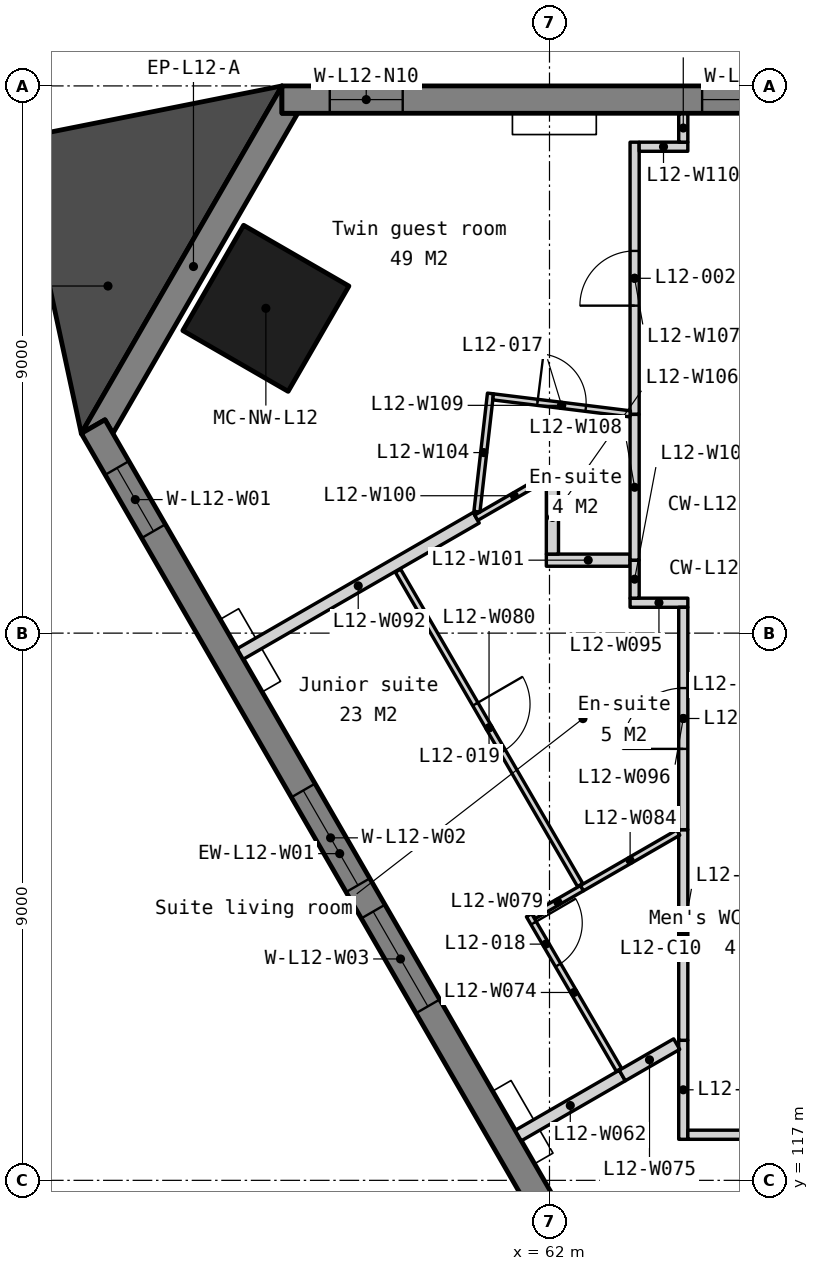
"""IFC4 building model, lengths in metres.
Left out: names, types, materials, properties, quantities, classifications, styles, units other than length and angle.
Written with IfcOpenShell. Run it as: python <this file> out.ifc"""

import sys

from ifc_helpers import new_model, si_unit, direction, frame, frame_2d, origin, origin_2d, place, context, subcontext, project, spatial, polyline, rectangle, outline, extrude, element, fill, save


model = new_model("IFC4")
c1 = context("Model", 3, precision=1e-05, world=origin(), true_north=direction((0.0, 1.0)))
c2 = subcontext(c1, "Body", "Model", "MODEL_VIEW")
j1 = project(units=[si_unit("LENGTHUNIT", "METRE"), si_unit("PLANEANGLEUNIT", "RADIAN")], contexts=[c1])
p1 = place(None, origin())
s1 = spatial("IfcSite", under=j1, at=p1, CompositionType="ELEMENT")
p2 = place(p1, origin())
s2 = spatial("IfcBuilding", under=s1, at=p2, CompositionType="ELEMENT")
p3 = place(p2, frame((0.0, 0.0, 56.0)))
s3 = spatial("IfcBuildingStorey", under=s2, at=p3, CompositionType="ELEMENT", Elevation=56.0)
p4 = place(p3, frame((57.336, 131.342, 0.0), z_axis=(0.0, 0.0, 1.0), x_axis=(-0.5, -0.866025403784, 0.0)))
e1 = element("IfcColumn", 1, at=p4, inside=s3, PredefinedType="COLUMN", context=c2, shape_type="SweptSolid", body=[
    extrude(rectangle(XDim=2.0, YDim=2.0, at=origin_2d()), origin(), (0.0, 0.0, 1.0), 3.5),
])
p5 = place(p3, frame((0.0, 0.0, -0.15)))
e2 = element("IfcWall", 2, at=p5, inside=s3, PredefinedType="SOLIDWALL", context=c2, shape_type="SweptSolid", body=[
    extrude(outline(polyline([(57.6, 135.0), (57.6, 134.55), (57.86, 134.55), (54.82, 129.284), (54.69, 129.509), (54.3, 129.284), (57.6, 135.0)])), origin(), (0.0, 0.0, 1.0), 3.5),
])
p6 = place(p3, frame((102.4, 134.775, -0.15), z_axis=(0.0, 0.0, 1.0), x_axis=(-1.0, 0.0, 0.0)))
e3 = element("IfcWall", 3, at=p6, inside=s3, PredefinedType="SOLIDWALL", context=c2, shape_type="SweptSolid", body=[
    extrude(outline(polyline([(44.8, 0.0), (44.8, 3.5), (0.0, 3.5), (0.0, 0.0), (44.8, 0.0)])), frame((0.0, 0.225, 0.0), z_axis=(0.0, -1.0, 0.0), x_axis=(1.0, 0.0, 0.0)), (0.0, 0.0, 1.0), 0.45),
])
p7 = place(p6, frame((0.786, 0.0, 1.05)))
e4 = element("IfcOpeningElement", 4, at=p7, cuts=e3, PredefinedType="OPENING", context=c2, shape_type="SweptSolid", body=[
    extrude(rectangle(XDim=1.2, YDim=1.5, at=frame_2d((0.6, 0.75))), frame((0.0, 0.235, 0.0), z_axis=(0.0, -1.0, 0.0), x_axis=(1.0, 0.0, 0.0)), (0.0, 0.0, 1.0), 0.47),
])
p8 = place(p6, frame((6.91, 0.0, 1.05)))
e5 = element("IfcOpeningElement", 5, at=p8, cuts=e3, PredefinedType="OPENING", context=c2, shape_type="SweptSolid", body=[
    extrude(rectangle(XDim=1.8, YDim=1.5, at=frame_2d((0.9, 0.75))), frame((0.0, 0.235, 0.0), z_axis=(0.0, -1.0, 0.0), x_axis=(1.0, 0.0, 0.0)), (0.0, 0.0, 1.0), 0.47),
])
p9 = place(p6, frame((9.21, 0.0, 1.05)))
e6 = element("IfcOpeningElement", 6, at=p9, cuts=e3, PredefinedType="OPENING", context=c2, shape_type="SweptSolid", body=[
    extrude(rectangle(XDim=1.8, YDim=1.5, at=frame_2d((0.9, 0.75))), frame((0.0, 0.235, 0.0), z_axis=(0.0, -1.0, 0.0), x_axis=(1.0, 0.0, 0.0)), (0.0, 0.0, 1.0), 0.47),
])
p10 = place(p6, frame((15.87, 0.0, 1.05)))
e7 = element("IfcOpeningElement", 7, at=p10, cuts=e3, PredefinedType="OPENING", context=c2, shape_type="SweptSolid", body=[
    extrude(rectangle(XDim=1.8, YDim=1.5, at=frame_2d((0.9, 0.75))), frame((0.0, 0.235, 0.0), z_axis=(0.0, -1.0, 0.0), x_axis=(1.0, 0.0, 0.0)), (0.0, 0.0, 1.0), 0.47),
])
p11 = place(p6, frame((18.17, 0.0, 1.05)))
e8 = element("IfcOpeningElement", 8, at=p11, cuts=e3, PredefinedType="OPENING", context=c2, shape_type="SweptSolid", body=[
    extrude(rectangle(XDim=1.8, YDim=1.5, at=frame_2d((0.9, 0.75))), frame((0.0, 0.235, 0.0), z_axis=(0.0, -1.0, 0.0), x_axis=(1.0, 0.0, 0.0)), (0.0, 0.0, 1.0), 0.47),
])
p12 = place(p6, frame((24.83, 0.0, 1.05)))
e9 = element("IfcOpeningElement", 9, at=p12, cuts=e3, PredefinedType="OPENING", context=c2, shape_type="SweptSolid", body=[
    extrude(rectangle(XDim=1.8, YDim=1.5, at=frame_2d((0.9, 0.75))), frame((0.0, 0.235, 0.0), z_axis=(0.0, -1.0, 0.0), x_axis=(1.0, 0.0, 0.0)), (0.0, 0.0, 1.0), 0.47),
])
p13 = place(p6, frame((27.13, 0.0, 1.05)))
e10 = element("IfcOpeningElement", 10, at=p13, cuts=e3, PredefinedType="OPENING", context=c2, shape_type="SweptSolid", body=[
    extrude(rectangle(XDim=1.8, YDim=1.5, at=frame_2d((0.9, 0.75))), frame((0.0, 0.235, 0.0), z_axis=(0.0, -1.0, 0.0), x_axis=(1.0, 0.0, 0.0)), (0.0, 0.0, 1.0), 0.47),
])
p14 = place(p6, frame((33.79, 0.0, 1.05)))
e11 = element("IfcOpeningElement", 11, at=p14, cuts=e3, PredefinedType="OPENING", context=c2, shape_type="SweptSolid", body=[
    extrude(rectangle(XDim=1.8, YDim=1.5, at=frame_2d((0.9, 0.75))), frame((0.0, 0.235, 0.0), z_axis=(0.0, -1.0, 0.0), x_axis=(1.0, 0.0, 0.0)), (0.0, 0.0, 1.0), 0.47),
])
p15 = place(p6, frame((36.09, 0.0, 1.05)))
e12 = element("IfcOpeningElement", 12, at=p15, cuts=e3, PredefinedType="OPENING", context=c2, shape_type="SweptSolid", body=[
    extrude(rectangle(XDim=1.8, YDim=1.5, at=frame_2d((0.9, 0.75))), frame((0.0, 0.235, 0.0), z_axis=(0.0, -1.0, 0.0), x_axis=(1.0, 0.0, 0.0)), (0.0, 0.0, 1.0), 0.47),
])
p16 = place(p6, frame((42.814, 0.0, 1.05)))
e13 = element("IfcOpeningElement", 13, at=p16, cuts=e3, PredefinedType="OPENING", context=c2, shape_type="SweptSolid", body=[
    extrude(rectangle(XDim=1.2, YDim=1.5, at=frame_2d((0.6, 0.75))), frame((0.0, 0.235, 0.0), z_axis=(0.0, -1.0, 0.0), x_axis=(1.0, 0.0, 0.0)), (0.0, 0.0, 1.0), 0.47),
])
p17 = place(p3, frame((54.495, 129.397, -0.15), z_axis=(0.0, 0.0, 1.0), x_axis=(0.499995201193, -0.866028174359, 0.0)))
e14 = element("IfcWall", 14, at=p17, inside=s3, PredefinedType="SOLIDWALL", context=c2, shape_type="SweptSolid", body=[
    extrude(outline(polyline([(0.0, 0.0), (0.0, 3.5), (16.22, 3.5), (16.22, 0.0), (0.0, 0.0)])), frame((0.0, 0.225, 0.0), z_axis=(0.0, -1.0, 0.0), x_axis=(1.0, 0.0, 0.0)), (0.0, 0.0, 1.0), 0.45),
])
p18 = place(p17, frame((0.786, 0.0, 1.05)))
e15 = element("IfcOpeningElement", 15, at=p18, cuts=e14, PredefinedType="OPENING", context=c2, shape_type="SweptSolid", body=[
    extrude(rectangle(XDim=1.2, YDim=1.5, at=frame_2d((0.6, 0.75))), frame((0.0, 0.235, 0.0), z_axis=(0.0, -1.0, 0.0), x_axis=(1.0, 0.0, 0.0)), (0.0, 0.0, 1.0), 0.47),
])
p19 = place(p17, frame((6.91, 0.0, 1.05)))
e16 = element("IfcOpeningElement", 16, at=p19, cuts=e14, PredefinedType="OPENING", context=c2, shape_type="SweptSolid", body=[
    extrude(rectangle(XDim=1.8, YDim=1.5, at=frame_2d((0.9, 0.75))), frame((0.0, 0.235, 0.0), z_axis=(0.0, -1.0, 0.0), x_axis=(1.0, 0.0, 0.0)), (0.0, 0.0, 1.0), 0.47),
])
p20 = place(p17, frame((9.21, 0.0, 1.05)))
e17 = element("IfcOpeningElement", 17, at=p20, cuts=e14, PredefinedType="OPENING", context=c2, shape_type="SweptSolid", body=[
    extrude(rectangle(XDim=1.8, YDim=1.5, at=frame_2d((0.9, 0.75))), frame((0.0, 0.235, 0.0), z_axis=(0.0, -1.0, 0.0), x_axis=(1.0, 0.0, 0.0)), (0.0, 0.0, 1.0), 0.47),
])
p21 = place(p2, frame((0.0, 0.0, 52.5)))
s4 = spatial("IfcBuildingStorey", under=s2, at=p21, CompositionType="ELEMENT", Elevation=52.5)
p22 = place(p21, frame((62.522, 115.042, 0.0), z_axis=(0.0, 0.0, 1.0), x_axis=(0.866047669374, 0.499961432884, 0.0)))
e18 = element("IfcWall", 18, at=p22, inside=s4, PredefinedType="SOLIDWALL", context=c2, shape_type="SweptSolid", body=[
    extrude(rectangle(XDim=3.95, YDim=0.45, at=frame_2d((1.975, 0.0))), origin(), (0.0, 0.0, 1.0), 6.85),
])
p23 = place(p3, frame((0.0, 0.0, -0.15)))
e19 = element("IfcWall", 19, at=p23, inside=s3, PredefinedType="SOLIDWALL", context=c2, shape_type="SweptSolid", body=[
    extrude(outline(polyline([(57.6, 135.0), (53.256, 134.134), (54.3, 129.284), (57.6, 135.0)])), origin(), (0.0, 0.0, 1.0), 3.5),
])
p24 = place(p3, frame((61.487, 117.737, 0.0), z_axis=(0.0, 0.0, 1.0), x_axis=(0.866051805705, 0.499954267743, 0.0)))
e20 = element("IfcWall", 20, at=p24, inside=s3, PredefinedType="PARTITIONING", context=c2, shape_type="SweptSolid", body=[
    extrude(rectangle(XDim=1.975, YDim=0.2, at=frame_2d((0.988, 0.0))), origin(), (0.0, 0.0, 1.0), 3.35),
])
p25 = place(p3, frame((64.2, 117.675, 0.0), z_axis=(0.0, 0.0, 1.0), x_axis=(0.0, 1.0, 0.0)))
e21 = element("IfcWall", 21, at=p25, inside=s3, PredefinedType="PARTITIONING", context=c2, shape_type="SweptSolid", body=[
    extrude(rectangle(XDim=1.628, YDim=0.15, at=frame_2d((0.814, 0.0))), origin(), (0.0, 0.0, 1.0), 3.35),
])
p26 = place(p3, frame((64.275, 117.75, 0.0), z_axis=(0.0, 0.0, 1.0), x_axis=(1.0, 0.0, 0.0)))
e22 = element("IfcWall", 22, at=p26, inside=s3, PredefinedType="PARTITIONING", context=c2, shape_type="SweptSolid", body=[
    extrude(rectangle(XDim=5.691, YDim=0.15, at=frame_2d((2.846, 0.0))), origin(), (0.0, 0.0, 1.0), 3.35),
])
p27 = place(p26, frame((2.396, 0.0, 0.0)))
e23 = element("IfcOpeningElement", 23, at=p27, cuts=e22, PredefinedType="OPENING", context=c2, shape_type="SweptSolid", body=[
    extrude(rectangle(XDim=0.9, YDim=2.1, at=frame_2d((0.45, 1.05))), frame((0.0, 0.085, 0.0), z_axis=(0.0, -1.0, 0.0), x_axis=(1.0, 0.0, 0.0)), (0.0, 0.0, 1.0), 0.17),
])
p28 = place(p3, frame((61.663, 121.361, 0.0), z_axis=(0.0, 0.0, 1.0), x_axis=(0.502884554521, -0.864353587847, 0.0)))
e24 = element("IfcWall", 24, at=p28, inside=s3, PredefinedType="PARTITIONING", context=c2, shape_type="SweptSolid", body=[
    extrude(rectangle(XDim=2.94, YDim=0.1, at=frame_2d((1.47, 0.0))), origin(), (0.0, 0.0, 1.0), 3.35),
])
p29 = place(p28, frame((0.15, 0.0, 0.0)))
e25 = element("IfcOpeningElement", 25, at=p29, cuts=e24, PredefinedType="OPENING", context=c2, shape_type="SweptSolid", body=[
    extrude(rectangle(XDim=0.8, YDim=2.1, at=frame_2d((0.4, 1.05))), frame((0.0, 0.06, 0.0), z_axis=(0.0, -1.0, 0.0), x_axis=(1.0, 0.0, 0.0)), (0.0, 0.0, 1.0), 0.12),
])
p30 = place(p3, frame((63.197, 118.724, 0.0), z_axis=(0.0, 0.0, 1.0), x_axis=(0.86596515875, 0.500104332946, 0.0)))
e26 = element("IfcWall", 26, at=p30, inside=s3, PredefinedType="PARTITIONING", context=c2, shape_type="SweptSolid", body=[
    extrude(rectangle(XDim=1.033, YDim=0.2, at=frame_2d((0.517, 0.0))), origin(), (0.0, 0.0, 1.0), 3.35),
])
p31 = place(p3, frame((61.74, 121.347, 0.0), z_axis=(0.0, 0.0, 1.0), x_axis=(0.866136792161, 0.499807020023, 0.0)))
e27 = element("IfcWall", 27, at=p31, inside=s3, PredefinedType="PARTITIONING", context=c2, shape_type="SweptSolid", body=[
    extrude(rectangle(XDim=0.916, YDim=0.1, at=frame_2d((0.458, 0.0))), origin(), (0.0, 0.0, 1.0), 3.35),
])
p32 = place(p3, frame((59.508, 127.028, 0.0), z_axis=(0.0, 0.0, 1.0), x_axis=(0.501422739792, -0.865202424881, 0.0)))
e28 = element("IfcWall", 28, at=p32, inside=s3, PredefinedType="PARTITIONING", context=c2, shape_type="SweptSolid", body=[
    extrude(rectangle(XDim=5.976, YDim=0.1, at=frame_2d((2.988, 0.0))), origin(), (0.0, 0.0, 1.0), 3.35),
])
p33 = place(p32, frame((2.538, 0.0, 0.0)))
e29 = element("IfcOpeningElement", 29, at=p33, cuts=e28, PredefinedType="OPENING", context=c2, shape_type="SweptSolid", body=[
    extrude(rectangle(XDim=0.9, YDim=2.1, at=frame_2d((0.45, 1.05))), frame((0.0, 0.06, 0.0), z_axis=(0.0, -1.0, 0.0), x_axis=(1.0, 0.0, 0.0)), (0.0, 0.0, 1.0), 0.12),
])
p34 = place(p3, frame((64.2, 119.303, 0.0), z_axis=(0.0, 0.0, 1.0), x_axis=(0.0, 1.0, 0.0)))
e30 = element("IfcWall", 30, at=p34, inside=s3, PredefinedType="PARTITIONING", context=c2, shape_type="SweptSolid", body=[
    extrude(rectangle(XDim=3.464, YDim=0.15, at=frame_2d((1.732, 0.0))), origin(), (0.0, 0.0, 1.0), 3.35),
])
p35 = place(p3, frame((62.534, 121.805, 0.0), z_axis=(0.0, 0.0, 1.0), x_axis=(0.866007702746, 0.500030657845, 0.0)))
e31 = element("IfcWall", 31, at=p35, inside=s3, PredefinedType="PARTITIONING", context=c2, shape_type="SweptSolid", body=[
    extrude(rectangle(XDim=1.829, YDim=0.1, at=frame_2d((0.914, 0.0))), origin(), (0.0, 0.0, 1.0), 3.35),
])
p36 = place(p3, frame((56.914, 125.657, 0.0), z_axis=(0.0, 0.0, 1.0), x_axis=(0.866018671298, 0.500011660828, 0.0)))
e32 = element("IfcWall", 32, at=p36, inside=s3, PredefinedType="PARTITIONING", context=c2, shape_type="SweptSolid", body=[
    extrude(rectangle(XDim=4.482, YDim=0.2, at=frame_2d((2.241, 0.0))), origin(), (0.0, 0.0, 1.0), 3.35),
])
p37 = place(p3, frame((63.325, 126.5, 0.0), z_axis=(0.0, 0.0, 1.0), x_axis=(1.0, 0.0, 0.0)))
e33 = element("IfcWall", 33, at=p37, inside=s3, PredefinedType="PARTITIONING", context=c2, shape_type="SweptSolid", body=[
    extrude(rectangle(XDim=0.95, YDim=0.15, at=frame_2d((0.475, 0.0))), origin(), (0.0, 0.0, 1.0), 3.35),
])
p38 = place(p3, frame((64.2, 122.767, 0.0), z_axis=(0.0, 0.0, 1.0), x_axis=(0.0, 1.0, 0.0)))
e34 = element("IfcWall", 34, at=p38, inside=s3, PredefinedType="PARTITIONING", context=c2, shape_type="SweptSolid", body=[
    extrude(rectangle(XDim=3.658, YDim=0.15, at=frame_2d((1.829, 0.0))), origin(), (0.0, 0.0, 1.0), 3.35),
])
p39 = place(p38, frame((1.329, 0.0, 0.0)))
e35 = element("IfcOpeningElement", 35, at=p39, cuts=e34, PredefinedType="OPENING", context=c2, shape_type="SweptSolid", body=[
    extrude(rectangle(XDim=1.0, YDim=2.1, at=frame_2d((0.5, 1.05))), frame((0.0, 0.085, 0.0), z_axis=(0.0, -1.0, 0.0), x_axis=(1.0, 0.0, 0.0)), (0.0, 0.0, 1.0), 0.17),
])
p40 = place(p3, frame((60.795, 127.898, 0.0), z_axis=(0.0, 0.0, 1.0), x_axis=(0.866022596503, 0.500004862322, 0.0)))
e36 = element("IfcWall", 36, at=p40, inside=s3, PredefinedType="PARTITIONING", context=c2, shape_type="SweptSolid", body=[
    extrude(rectangle(XDim=1.447, YDim=0.1, at=frame_2d((0.723, 0.0))), origin(), (0.0, 0.0, 1.0), 3.35),
])
p41 = place(p3, frame((61.948, 127.2, 0.0), z_axis=(0.0, 0.0, 1.0), x_axis=(1.0, 0.0, 0.0)))
e37 = element("IfcWall", 37, at=p41, inside=s3, PredefinedType="PARTITIONING", context=c2, shape_type="SweptSolid", body=[
    extrude(rectangle(XDim=1.377, YDim=0.2, at=frame_2d((0.688, 0.0))), origin(), (0.0, 0.0, 1.0), 3.35),
])
p42 = place(p3, frame((63.4, 126.575, 0.0), z_axis=(0.0, 0.0, 1.0), x_axis=(0.0, 1.0, 0.0)))
e38 = element("IfcWall", 38, at=p42, inside=s3, PredefinedType="PARTITIONING", context=c2, shape_type="SweptSolid", body=[
    extrude(rectangle(XDim=0.625, YDim=0.15, at=frame_2d((0.312, 0.0))), origin(), (0.0, 0.0, 1.0), 3.35),
])
p43 = place(p3, frame((60.806, 127.997, 0.0), z_axis=(0.0, 0.0, 1.0), x_axis=(0.114018020477, 0.993478681707, 0.0)))
e39 = element("IfcWall", 39, at=p43, inside=s3, PredefinedType="PARTITIONING", context=c2, shape_type="SweptSolid", body=[
    extrude(rectangle(XDim=1.957, YDim=0.1, at=frame_2d((0.979, 0.0))), origin(), (0.0, 0.0, 1.0), 3.35),
])
p44 = place(p3, frame((62.048, 127.3, 0.0), z_axis=(0.0, 0.0, 1.0), x_axis=(0.0, 1.0, 0.0)))
e40 = element("IfcWall", 40, at=p44, inside=s3, PredefinedType="PARTITIONING", context=c2, shape_type="SweptSolid", body=[
    extrude(rectangle(XDim=1.206, YDim=0.2, at=frame_2d((0.603, 0.0))), origin(), (0.0, 0.0, 1.0), 3.35),
])
p45 = place(p3, frame((63.4, 129.597, 0.0), z_axis=(0.0, 0.0, 1.0), x_axis=(0.0, 1.0, 0.0)))
e41 = element("IfcWall", 41, at=p45, inside=s3, PredefinedType="PARTITIONING", context=c2, shape_type="SweptSolid", body=[
    extrude(rectangle(XDim=4.477, YDim=0.15, at=frame_2d((2.239, 0.0))), origin(), (0.0, 0.0, 1.0), 3.35),
])
p46 = place(p45, frame((1.789, 0.0, 0.0)))
e42 = element("IfcOpeningElement", 42, at=p46, cuts=e41, PredefinedType="OPENING", context=c2, shape_type="SweptSolid", body=[
    extrude(rectangle(XDim=0.9, YDim=2.1, at=frame_2d((0.45, 1.05))), frame((0.0, 0.085, 0.0), z_axis=(0.0, -1.0, 0.0), x_axis=(1.0, 0.0, 0.0)), (0.0, 0.0, 1.0), 0.17),
])
p47 = place(p3, frame((63.4, 127.2, 0.0), z_axis=(0.0, 0.0, 1.0), x_axis=(0.0, 1.0, 0.0)))
e43 = element("IfcWall", 43, at=p47, inside=s3, PredefinedType="PARTITIONING", context=c2, shape_type="SweptSolid", body=[
    extrude(rectangle(XDim=2.397, YDim=0.15, at=frame_2d((1.199, 0.0))), origin(), (0.0, 0.0, 1.0), 3.35),
])
p48 = place(p3, frame((61.073, 129.886, 0.0), z_axis=(0.0, 0.0, 1.0), x_axis=(0.992399852351, -0.123055000118, 0.0)))
e44 = element("IfcWall", 44, at=p48, inside=s3, PredefinedType="PARTITIONING", context=c2, shape_type="SweptSolid", body=[
    extrude(rectangle(XDim=2.27, YDim=0.1, at=frame_2d((1.135, 0.0))), origin(), (0.0, 0.0, 1.0), 3.35),
])
p49 = place(p48, frame((0.735, 0.0, 0.0)))
e45 = element("IfcOpeningElement", 45, at=p49, cuts=e44, PredefinedType="OPENING", context=c2, shape_type="SweptSolid", body=[
    extrude(rectangle(XDim=0.8, YDim=2.1, at=frame_2d((0.4, 1.05))), frame((0.0, 0.06, 0.0), z_axis=(0.0, -1.0, 0.0), x_axis=(1.0, 0.0, 0.0)), (0.0, 0.0, 1.0), 0.12),
])
p50 = place(p3, frame((63.475, 134.0, 0.0), z_axis=(0.0, 0.0, 1.0), x_axis=(0.999999813645, 0.000610500497, 0.0)))
e46 = element("IfcWall", 46, at=p50, inside=s3, PredefinedType="PARTITIONING", context=c2, shape_type="SweptSolid", body=[
    extrude(rectangle(XDim=0.8, YDim=0.15, at=frame_2d((0.4, 0.0))), origin(), (0.0, 0.0, 1.0), 2.887),
])
p51 = place(p3, frame((64.2, 134.075, 0.0), z_axis=(0.0, 0.0, 1.0), x_axis=(0.0, 1.0, 0.0)))
e47 = element("IfcWall", 47, at=p51, inside=s3, PredefinedType="PARTITIONING", context=c2, shape_type="SweptSolid", body=[
    extrude(rectangle(XDim=0.465, YDim=0.15, at=frame_2d((0.232, 0.0))), origin(), (0.0, 0.0, 1.0), 3.35),
])
p52 = place(p15, origin())
e48 = element("IfcWindow", 48, at=p52, inside=s3, PartitioningType="SINGLE_PANEL", PredefinedType="WINDOW", context=c2, shape_type="SweptSolid", body=[
    extrude(rectangle(XDim=1.8, YDim=1.5, at=frame_2d((0.9, 0.75))), frame((0.0, 0.03, 0.0), z_axis=(0.0, -1.0, 0.0), x_axis=(1.0, 0.0, 0.0)), (0.0, 0.0, 1.0), 0.06),
])
fill(e12, e48)
p53 = place(p16, origin())
e49 = element("IfcWindow", 49, at=p53, inside=s3, PartitioningType="SINGLE_PANEL", PredefinedType="WINDOW", context=c2, shape_type="SweptSolid", body=[
    extrude(rectangle(XDim=1.2, YDim=1.5, at=frame_2d((0.6, 0.75))), frame((0.0, 0.03, 0.0), z_axis=(0.0, -1.0, 0.0), x_axis=(1.0, 0.0, 0.0)), (0.0, 0.0, 1.0), 0.06),
])
fill(e13, e49)
p54 = place(p18, origin())
e50 = element("IfcWindow", 50, at=p54, inside=s3, PartitioningType="SINGLE_PANEL", PredefinedType="WINDOW", context=c2, shape_type="SweptSolid", body=[
    extrude(rectangle(XDim=1.2, YDim=1.5, at=frame_2d((0.6, 0.75))), frame((0.0, 0.03, 0.0), z_axis=(0.0, -1.0, 0.0), x_axis=(1.0, 0.0, 0.0)), (0.0, 0.0, 1.0), 0.06),
])
fill(e15, e50)
p55 = place(p19, origin())
e51 = element("IfcWindow", 51, at=p55, inside=s3, PartitioningType="SINGLE_PANEL", PredefinedType="WINDOW", context=c2, shape_type="SweptSolid", body=[
    extrude(rectangle(XDim=1.8, YDim=1.5, at=frame_2d((0.9, 0.75))), frame((0.0, 0.03, 0.0), z_axis=(0.0, -1.0, 0.0), x_axis=(1.0, 0.0, 0.0)), (0.0, 0.0, 1.0), 0.06),
])
fill(e16, e51)
p56 = place(p20, origin())
e52 = element("IfcWindow", 52, at=p56, inside=s3, PartitioningType="SINGLE_PANEL", PredefinedType="WINDOW", context=c2, shape_type="SweptSolid", body=[
    extrude(rectangle(XDim=1.8, YDim=1.5, at=frame_2d((0.9, 0.75))), frame((0.0, 0.03, 0.0), z_axis=(0.0, -1.0, 0.0), x_axis=(1.0, 0.0, 0.0)), (0.0, 0.0, 1.0), 0.06),
])
fill(e17, e52)
p57 = place(p46, origin())
e53 = element("IfcDoor", 53, at=p57, inside=s3, OperationType="SINGLE_SWING_LEFT", PredefinedType="DOOR", context=c2, shape_type="SweptSolid", body=[
    extrude(rectangle(XDim=0.9, YDim=2.1, at=frame_2d((0.45, 1.05))), frame((0.0, 0.025, 0.0), z_axis=(0.0, -1.0, 0.0), x_axis=(1.0, 0.0, 0.0)), (0.0, 0.0, 1.0), 0.05),
])
fill(e42, e53)
p58 = place(p39, origin())
e54 = element("IfcDoor", 54, at=p58, inside=s3, OperationType="SINGLE_SWING_LEFT", PredefinedType="DOOR", context=c2, shape_type="SweptSolid", body=[
    extrude(rectangle(XDim=1.0, YDim=2.1, at=frame_2d((0.5, 1.05))), frame((0.0, 0.025, 0.0), z_axis=(0.0, -1.0, 0.0), x_axis=(1.0, 0.0, 0.0)), (0.0, 0.0, 1.0), 0.05),
])
fill(e35, e54)
p59 = place(p49, origin())
e55 = element("IfcDoor", 55, at=p59, inside=s3, OperationType="SINGLE_SWING_LEFT", PredefinedType="DOOR", context=c2, shape_type="SweptSolid", body=[
    extrude(rectangle(XDim=0.8, YDim=2.1, at=frame_2d((0.4, 1.05))), frame((0.0, 0.025, 0.0), z_axis=(0.0, -1.0, 0.0), x_axis=(1.0, 0.0, 0.0)), (0.0, 0.0, 1.0), 0.05),
])
fill(e45, e55)
p60 = place(p29, origin())
e56 = element("IfcDoor", 56, at=p60, inside=s3, OperationType="SINGLE_SWING_LEFT", PredefinedType="DOOR", context=c2, shape_type="SweptSolid", body=[
    extrude(rectangle(XDim=0.8, YDim=2.1, at=frame_2d((0.4, 1.05))), frame((0.0, 0.025, 0.0), z_axis=(0.0, -1.0, 0.0), x_axis=(1.0, 0.0, 0.0)), (0.0, 0.0, 1.0), 0.05),
])
fill(e25, e56)
p61 = place(p33, origin())
e57 = element("IfcDoor", 57, at=p61, inside=s3, OperationType="SINGLE_SWING_LEFT", PredefinedType="DOOR", context=c2, shape_type="SweptSolid", body=[
    extrude(rectangle(XDim=0.9, YDim=2.1, at=frame_2d((0.45, 1.05))), frame((0.0, 0.025, 0.0), z_axis=(0.0, -1.0, 0.0), x_axis=(1.0, 0.0, 0.0)), (0.0, 0.0, 1.0), 0.05),
])
fill(e29, e57)
save(model, sys.argv[1])
